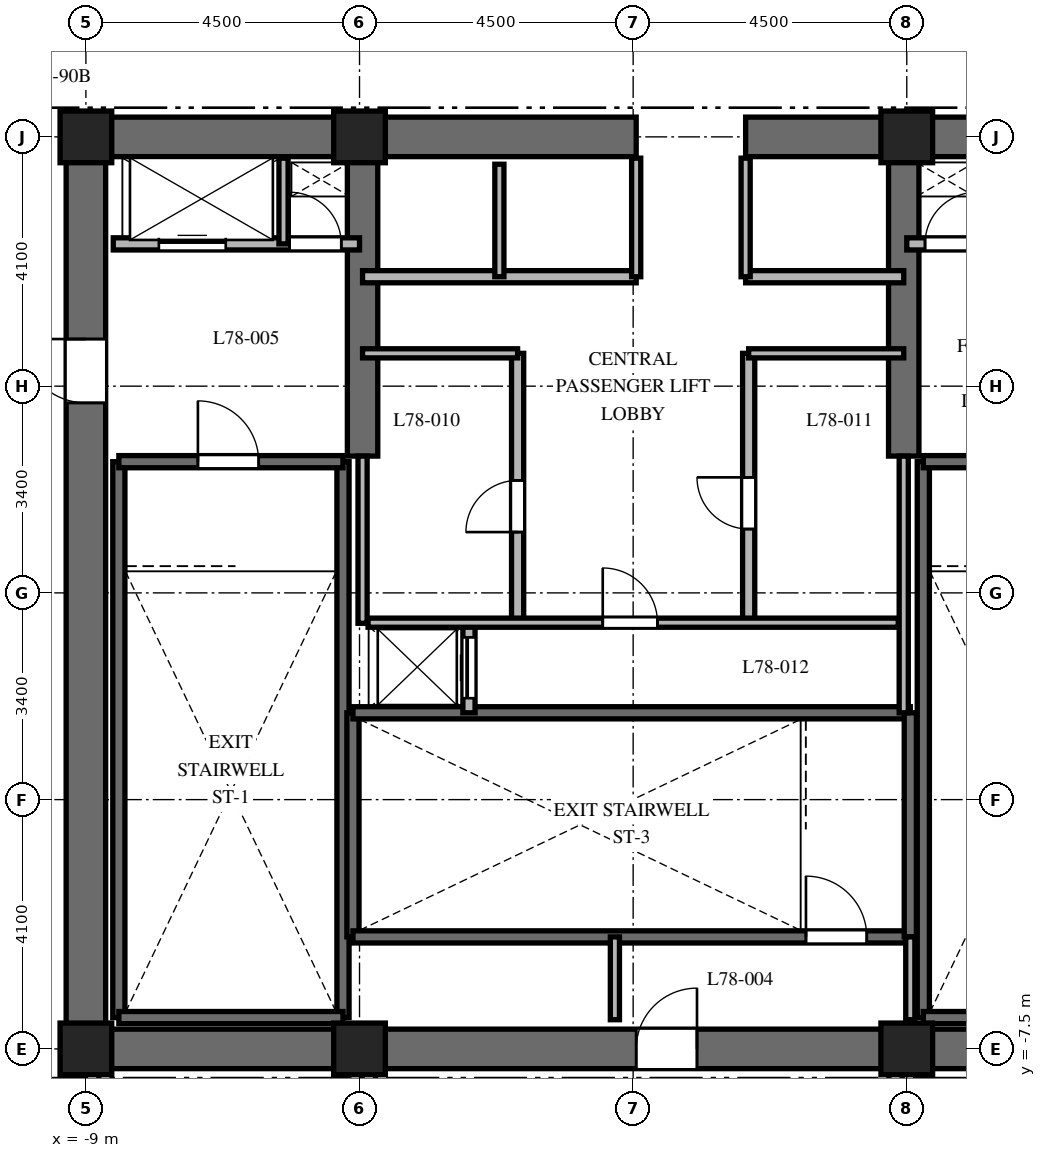
"""IFC4 building model, lengths in metres.
Left out: names, types, materials, properties, quantities, classifications, styles, units other than length and angle.
Written with IfcOpenShell. Run it as: python <this file> out.ifc"""

import sys

from ifc_helpers import new_model, si_unit, direction, frame, frame_2d, origin, origin_2d, place, context, subcontext, project, spatial, rectangle, extrude, element, fill, save


model = new_model("IFC4")
c1 = context("Model", 3, precision=1e-05, world=origin(), true_north=direction((0.0, 1.0)))
c2 = subcontext(c1, "Body", "Model", "MODEL_VIEW")
j1 = project(units=[si_unit("LENGTHUNIT", "METRE"), si_unit("PLANEANGLEUNIT", "RADIAN")], contexts=[c1])
p1 = place(None, origin())
s1 = spatial("IfcSite", under=j1, at=p1, CompositionType="ELEMENT")
p2 = place(p1, origin())
s2 = spatial("IfcBuilding", under=s1, at=p2, CompositionType="ELEMENT")
p3 = place(p2, frame((0.0, 0.0, 315.9)))
s3 = spatial("IfcBuildingStorey", under=s2, at=p3, CompositionType="ELEMENT", Elevation=315.9)
p4 = place(p3, frame((-9.325, -7.5, 0.0), z_axis=(0.0, 0.0, 1.0), x_axis=(1.0, 0.0, 0.0)))
e1 = element("IfcWall", 1, at=p4, inside=s3, PredefinedType="SHEAR", context=c2, shape_type="SweptSolid", body=[
    extrude(rectangle(XDim=18.65, YDim=0.65, at=frame_2d((9.325, 0.0))), origin(), (0.0, 0.0, 1.0), 5.5),
])
p5 = place(p4, frame((9.375, 0.0, 0.0)))
e2 = element("IfcOpeningElement", 2, at=p5, cuts=e1, PredefinedType="OPENING", context=c2, shape_type="SweptSolid", body=[
    extrude(rectangle(XDim=1.0, YDim=2.15, at=frame_2d((0.5, 1.075))), frame((0.0, 0.335, 0.0), z_axis=(0.0, -1.0, 0.0), x_axis=(1.0, 0.0, 0.0)), (0.0, 0.0, 1.0), 0.67),
])
p6 = place(p3, frame((-9.325, 7.5, 0.0), z_axis=(0.0, 0.0, 1.0), x_axis=(1.0, 0.0, 0.0)))
e3 = element("IfcWall", 3, at=p6, inside=s3, PredefinedType="SHEAR", context=c2, shape_type="SweptSolid", body=[
    extrude(rectangle(XDim=9.375, YDim=0.65, at=frame_2d((4.688, 0.0))), origin(), (0.0, 0.0, 1.0), 5.5),
])
p7 = place(p3, frame((1.85, 7.5, 0.0), z_axis=(0.0, 0.0, 1.0), x_axis=(1.0, 0.0, 0.0)))
e4 = element("IfcWall", 4, at=p7, inside=s3, PredefinedType="SHEAR", context=c2, shape_type="SweptSolid", body=[
    extrude(rectangle(XDim=7.475, YDim=0.65, at=frame_2d((3.737, 0.0))), origin(), (0.0, 0.0, 1.0), 5.5),
])
p8 = place(p3, frame((-9.0, -7.175, 0.0), z_axis=(0.0, 0.0, 1.0), x_axis=(0.0, 1.0, 0.0)))
e5 = element("IfcWall", 5, at=p8, inside=s3, PredefinedType="SHEAR", context=c2, shape_type="SweptSolid", body=[
    extrude(rectangle(XDim=14.35, YDim=0.65, at=frame_2d((7.175, 0.0))), origin(), (0.0, 0.0, 1.0), 5.5),
])
p9 = place(p8, frame((10.3, 0.0, 0.0)))
e6 = element("IfcOpeningElement", 6, at=p9, cuts=e5, PredefinedType="OPENING", context=c2, shape_type="SweptSolid", body=[
    extrude(rectangle(XDim=1.05, YDim=2.15, at=frame_2d((0.525, 1.075))), frame((0.0, 0.335, 0.0), z_axis=(0.0, -1.0, 0.0), x_axis=(1.0, 0.0, 0.0)), (0.0, 0.0, 1.0), 0.67),
])
for number, where, z_axis, x_axis in (
    (7, (-4.45, 2.25, 0.0), (0.0, 0.0, 1.0), (0.0, 1.0, 0.0)),
    (8, (4.45, 2.25, 0.0), (0.0, 0.0, 1.0), (0.0, 1.0, 0.0)),
):
    element("IfcWall", number, at=place(p3, frame(where, z_axis=z_axis, x_axis=x_axis)), inside=s3, PredefinedType="SHEAR", context=c2, shape_type="SweptSolid", body=[
        extrude(rectangle(XDim=4.925, YDim=0.5, at=frame_2d((2.462, 0.0))), origin(), (0.0, 0.0, 1.0), 5.5),
    ])
for number, where, z_axis, x_axis in (
    (9, (-8.458, -6.985, 0.0), (0.0, 0.0, 1.0), (0.0, 1.0, 0.0)),
    (10, (-4.772, -6.985, 0.0), (0.0, 0.0, 1.0), (0.0, 1.0, 0.0)),
):
    element("IfcWall", number, at=place(p3, frame(where, z_axis=z_axis, x_axis=x_axis)), inside=s3, PredefinedType="SHEAR", context=c2, shape_type="SweptSolid", body=[
        extrude(rectangle(XDim=9.143, YDim=0.2, at=frame_2d((4.572, 0.0))), origin(), (0.0, 0.0, 1.0), 5.5),
    ])
p10 = place(p3, frame((-8.458, -6.985, 0.0), z_axis=(0.0, 0.0, 1.0), x_axis=(1.0, 0.0, 0.0)))
e11 = element("IfcWall", 11, at=p10, inside=s3, PredefinedType="SHEAR", context=c2, shape_type="SweptSolid", body=[
    extrude(rectangle(XDim=3.686, YDim=0.2, at=frame_2d((1.843, 0.0))), origin(), (0.0, 0.0, 1.0), 5.5),
])
p11 = place(p3, frame((-8.458, 2.158, 0.0), z_axis=(0.0, 0.0, 1.0), x_axis=(1.0, 0.0, 0.0)))
e12 = element("IfcWall", 12, at=p11, inside=s3, PredefinedType="SHEAR", context=c2, shape_type="SweptSolid", body=[
    extrude(rectangle(XDim=3.686, YDim=0.2, at=frame_2d((1.843, 0.0))), origin(), (0.0, 0.0, 1.0), 5.5),
])
p12 = place(p11, frame((1.3, 0.0, 0.0)))
e13 = element("IfcOpeningElement", 13, at=p12, cuts=e12, PredefinedType="OPENING", context=c2, shape_type="SweptSolid", body=[
    extrude(rectangle(XDim=1.0, YDim=2.15, at=frame_2d((0.5, 1.075))), frame((0.0, 0.11, 0.0), z_axis=(0.0, -1.0, 0.0), x_axis=(1.0, 0.0, 0.0)), (0.0, 0.0, 1.0), 0.22),
])
p13 = place(p3, frame((4.772, -6.985, 0.0), z_axis=(0.0, 0.0, 1.0), x_axis=(0.0, 1.0, 0.0)))
e14 = element("IfcWall", 14, at=p13, inside=s3, PredefinedType="SHEAR", context=c2, shape_type="SweptSolid", body=[
    extrude(rectangle(XDim=9.143, YDim=0.2, at=frame_2d((4.572, 0.0))), origin(), (0.0, 0.0, 1.0), 5.5),
])
p14 = place(p3, frame((4.772, -6.985, 0.0), z_axis=(0.0, 0.0, 1.0), x_axis=(1.0, 0.0, 0.0)))
e15 = element("IfcWall", 15, at=p14, inside=s3, PredefinedType="SHEAR", context=c2, shape_type="SweptSolid", body=[
    extrude(rectangle(XDim=3.686, YDim=0.2, at=frame_2d((1.843, 0.0))), origin(), (0.0, 0.0, 1.0), 5.5),
])
p15 = place(p3, frame((4.772, 2.158, 0.0), z_axis=(0.0, 0.0, 1.0), x_axis=(1.0, 0.0, 0.0)))
e16 = element("IfcWall", 16, at=p15, inside=s3, PredefinedType="SHEAR", context=c2, shape_type="SweptSolid", body=[
    extrude(rectangle(XDim=3.686, YDim=0.2, at=frame_2d((1.843, 0.0))), origin(), (0.0, 0.0, 1.0), 5.5),
])
p16 = place(p15, frame((1.35, 0.0, 0.0)))
e17 = element("IfcOpeningElement", 17, at=p16, cuts=e16, PredefinedType="OPENING", context=c2, shape_type="SweptSolid", body=[
    extrude(rectangle(XDim=1.0, YDim=2.15, at=frame_2d((0.5, 1.075))), frame((0.0, 0.11, 0.0), z_axis=(0.0, -1.0, 0.0), x_axis=(1.0, 0.0, 0.0)), (0.0, 0.0, 1.0), 0.22),
])
p17 = place(p3, frame((-4.608, -5.658, 0.0), z_axis=(0.0, 0.0, 1.0), x_axis=(0.0, 1.0, 0.0)))
e18 = element("IfcWall", 18, at=p17, inside=s3, PredefinedType="SHEAR", context=c2, shape_type="SweptSolid", body=[
    extrude(rectangle(XDim=3.686, YDim=0.2, at=frame_2d((1.843, 0.0))), origin(), (0.0, 0.0, 1.0), 5.5),
])
p18 = place(p3, frame((-4.608, -5.658, 0.0), z_axis=(0.0, 0.0, 1.0), x_axis=(1.0, 0.0, 0.0)))
e19 = element("IfcWall", 19, at=p18, inside=s3, PredefinedType="SHEAR", context=c2, shape_type="SweptSolid", body=[
    extrude(rectangle(XDim=9.166, YDim=0.2, at=frame_2d((4.583, 0.0))), origin(), (0.0, 0.0, 1.0), 5.5),
])
p19 = place(p18, frame((7.45, 0.0, 0.0)))
e20 = element("IfcOpeningElement", 20, at=p19, cuts=e19, PredefinedType="OPENING", context=c2, shape_type="SweptSolid", body=[
    extrude(rectangle(XDim=1.0, YDim=2.15, at=frame_2d((0.5, 1.075))), frame((0.0, 0.11, 0.0), z_axis=(0.0, -1.0, 0.0), x_axis=(1.0, 0.0, 0.0)), (0.0, 0.0, 1.0), 0.22),
])
p20 = place(p3, frame((-4.608, -1.972, 0.0), z_axis=(0.0, 0.0, 1.0), x_axis=(1.0, 0.0, 0.0)))
e21 = element("IfcWall", 21, at=p20, inside=s3, PredefinedType="SHEAR", context=c2, shape_type="SweptSolid", body=[
    extrude(rectangle(XDim=9.166, YDim=0.2, at=frame_2d((4.583, 0.0))), origin(), (0.0, 0.0, 1.0), 5.5),
])
p21 = place(p3, frame((4.558, -5.658, 0.0), z_axis=(0.0, 0.0, 1.0), x_axis=(0.0, 1.0, 0.0)))
e22 = element("IfcWall", 22, at=p21, inside=s3, PredefinedType="SHEAR", context=c2, shape_type="SweptSolid", body=[
    extrude(rectangle(XDim=3.686, YDim=0.2, at=frame_2d((1.843, 0.0))), origin(), (0.0, 0.0, 1.0), 5.5),
])
for number, where, z_axis, x_axis in (
    (23, (-9.0, -7.5, 0.0), (0.0, 0.0, 1.0), (1.0, 0.0, 0.0)),
    (24, (-4.5, -7.5, 0.0), (0.0, 0.0, 1.0), (1.0, 0.0, 0.0)),
    (25, (4.5, -7.5, 0.0), (0.0, 0.0, 1.0), (1.0, 0.0, 0.0)),
    (26, (4.5, 7.5, 0.0), (0.0, 0.0, 1.0), (1.0, 0.0, 0.0)),
    (27, (-4.5, 7.5, 0.0), (0.0, 0.0, 1.0), (1.0, 0.0, 0.0)),
    (28, (-9.0, 7.5, 0.0), (0.0, 0.0, 1.0), (1.0, 0.0, 0.0)),
):
    element("IfcColumn", number, at=place(p3, frame(where, z_axis=z_axis, x_axis=x_axis)), inside=s3, PredefinedType="COLUMN", context=c2, shape_type="SweptSolid", body=[
        extrude(rectangle(XDim=0.85, YDim=0.85, at=origin_2d()), origin(), (0.0, 0.0, 1.0), 5.5),
    ])
for number, where, z_axis, x_axis in (
    (29, (-0.3, -7.02, 0.0), (0.0, 0.0, 1.0), (0.0, 1.0, 0.0)),
    (30, (4.558, -7.02, 0.0), (0.0, 0.0, 1.0), (0.0, 1.0, 0.0)),
):
    element("IfcWall", number, at=place(p3, frame(where, z_axis=z_axis, x_axis=x_axis)), inside=s3, PredefinedType="PARTITIONING", context=c2, shape_type="SweptSolid", body=[
        extrude(rectangle(XDim=1.362, YDim=0.15, at=frame_2d((0.681, 0.0))), origin(), (0.0, 0.0, 1.0), 5.18),
    ])
p22 = place(p3, frame((-8.55, 5.74, 0.0), z_axis=(0.0, 0.0, 1.0), x_axis=(1.0, 0.0, 0.0)))
e31 = element("IfcWall", 31, at=p22, inside=s3, PredefinedType="PARTITIONING", context=c2, shape_type="SweptSolid", body=[
    extrude(rectangle(XDim=4.05, YDim=0.2, at=frame_2d((2.025, 0.0))), origin(), (0.0, 0.0, 1.0), 5.18),
])
p23 = place(p22, frame((0.75, 0.0, 0.0)))
e32 = element("IfcOpeningElement", 32, at=p23, cuts=e31, PredefinedType="OPENING", context=c2, shape_type="SweptSolid", body=[
    extrude(rectangle(XDim=1.1, YDim=2.2, at=frame_2d((0.55, 1.1))), frame((0.0, 0.11, 0.0), z_axis=(0.0, -1.0, 0.0), x_axis=(1.0, 0.0, 0.0)), (0.0, 0.0, 1.0), 0.22),
])
p24 = place(p22, frame((2.9, 0.0, 0.0)))
e33 = element("IfcOpeningElement", 33, at=p24, cuts=e31, PredefinedType="OPENING", context=c2, shape_type="SweptSolid", body=[
    extrude(rectangle(XDim=0.85, YDim=2.03, at=frame_2d((0.425, 1.015))), frame((0.0, 0.11, 0.0), z_axis=(0.0, -1.0, 0.0), x_axis=(1.0, 0.0, 0.0)), (0.0, 0.0, 1.0), 0.22),
])
p25 = place(p3, frame((-5.75, 5.74, 0.0), z_axis=(0.0, 0.0, 1.0), x_axis=(0.0, 1.0, 0.0)))
e34 = element("IfcWall", 34, at=p25, inside=s3, PredefinedType="PARTITIONING", context=c2, shape_type="SweptSolid", body=[
    extrude(rectangle(XDim=1.41, YDim=0.15, at=frame_2d((0.705, 0.0))), origin(), (0.0, 0.0, 1.0), 5.18),
])
p26 = place(p3, frame((4.5, 5.74, 0.0), z_axis=(0.0, 0.0, 1.0), x_axis=(1.0, 0.0, 0.0)))
e35 = element("IfcWall", 35, at=p26, inside=s3, PredefinedType="PARTITIONING", context=c2, shape_type="SweptSolid", body=[
    extrude(rectangle(XDim=4.05, YDim=0.2, at=frame_2d((2.025, 0.0))), origin(), (0.0, 0.0, 1.0), 5.18),
])
p27 = place(p26, frame((0.3, 0.0, 0.0)))
e36 = element("IfcOpeningElement", 36, at=p27, cuts=e35, PredefinedType="OPENING", context=c2, shape_type="SweptSolid", body=[
    extrude(rectangle(XDim=0.85, YDim=2.03, at=frame_2d((0.425, 1.015))), frame((0.0, 0.11, 0.0), z_axis=(0.0, -1.0, 0.0), x_axis=(1.0, 0.0, 0.0)), (0.0, 0.0, 1.0), 0.22),
])
p28 = place(p26, frame((2.15, 0.0, 0.0)))
e37 = element("IfcOpeningElement", 37, at=p28, cuts=e35, PredefinedType="OPENING", context=c2, shape_type="SweptSolid", body=[
    extrude(rectangle(XDim=1.1, YDim=2.2, at=frame_2d((0.55, 1.1))), frame((0.0, 0.11, 0.0), z_axis=(0.0, -1.0, 0.0), x_axis=(1.0, 0.0, 0.0)), (0.0, 0.0, 1.0), 0.22),
])
p29 = place(p3, frame((-2.7, -1.972, 0.0), z_axis=(0.0, 0.0, 1.0), x_axis=(0.0, 1.0, 0.0)))
e38 = element("IfcWall", 38, at=p29, inside=s3, PredefinedType="PARTITIONING", context=c2, shape_type="SweptSolid", body=[
    extrude(rectangle(XDim=1.472, YDim=0.2, at=frame_2d((0.736, 0.0))), origin(), (0.0, 0.0, 1.0), 5.18),
])
p30 = place(p29, frame((0.24, 0.0, 0.0)))
e39 = element("IfcOpeningElement", 39, at=p30, cuts=e38, PredefinedType="OPENING", context=c2, shape_type="SweptSolid", body=[
    extrude(rectangle(XDim=1.0, YDim=2.2, at=frame_2d((0.5, 1.1))), frame((0.0, 0.11, 0.0), z_axis=(0.0, -1.0, 0.0), x_axis=(1.0, 0.0, 0.0)), (0.0, 0.0, 1.0), 0.22),
])
p31 = place(p3, frame((-4.45, 5.2, 0.0), z_axis=(0.0, 0.0, 1.0), x_axis=(1.0, 0.0, 0.0)))
e40 = element("IfcWall", 40, at=p31, inside=s3, PredefinedType="PARTITIONING", context=c2, shape_type="SweptSolid", body=[
    extrude(rectangle(XDim=4.5, YDim=0.2, at=frame_2d((2.25, 0.0))), origin(), (0.0, 0.0, 1.0), 5.18),
])
p32 = place(p3, frame((1.85, 5.2, 0.0), z_axis=(0.0, 0.0, 1.0), x_axis=(1.0, 0.0, 0.0)))
e41 = element("IfcWall", 41, at=p32, inside=s3, PredefinedType="PARTITIONING", context=c2, shape_type="SweptSolid", body=[
    extrude(rectangle(XDim=2.6, YDim=0.2, at=frame_2d((1.3, 0.0))), origin(), (0.0, 0.0, 1.0), 5.18),
])
p33 = place(p3, frame((-2.2, 5.2, 0.0), z_axis=(0.0, 0.0, 1.0), x_axis=(0.0, 1.0, 0.0)))
e42 = element("IfcWall", 42, at=p33, inside=s3, PredefinedType="PARTITIONING", context=c2, shape_type="SweptSolid", body=[
    extrude(rectangle(XDim=1.85, YDim=0.15, at=frame_2d((0.925, 0.0))), origin(), (0.0, 0.0, 1.0), 5.18),
])
for number, where, z_axis, x_axis in (
    (43, (0.05, 5.2, 0.0), (0.0, 0.0, 1.0), (0.0, 1.0, 0.0)),
    (44, (1.85, 5.2, 0.0), (0.0, 0.0, 1.0), (0.0, 1.0, 0.0)),
):
    element("IfcWall", number, at=place(p3, frame(where, z_axis=z_axis, x_axis=x_axis)), inside=s3, PredefinedType="PARTITIONING", context=c2, shape_type="SweptSolid", body=[
        extrude(rectangle(XDim=1.95, YDim=0.15, at=frame_2d((0.975, 0.0))), origin(), (0.0, 0.0, 1.0), 5.18),
    ])
p34 = place(p3, frame((-4.45, -0.5, 0.0), z_axis=(0.0, 0.0, 1.0), x_axis=(0.0, 1.0, 0.0)))
e45 = element("IfcWall", 45, at=p34, inside=s3, PredefinedType="PARTITIONING", context=c2, shape_type="SweptSolid", body=[
    extrude(rectangle(XDim=2.75, YDim=0.15, at=frame_2d((1.375, 0.0))), origin(), (0.0, 0.0, 1.0), 5.18),
])
p35 = place(p3, frame((4.45, -1.972, 0.0), z_axis=(0.0, 0.0, 1.0), x_axis=(0.0, 1.0, 0.0)))
e46 = element("IfcWall", 46, at=p35, inside=s3, PredefinedType="PARTITIONING", context=c2, shape_type="SweptSolid", body=[
    extrude(rectangle(XDim=4.222, YDim=0.15, at=frame_2d((2.111, 0.0))), origin(), (0.0, 0.0, 1.0), 5.18),
])
p36 = place(p3, frame((-1.9, -0.5, 0.0), z_axis=(0.0, 0.0, 1.0), x_axis=(0.0, 1.0, 0.0)))
e47 = element("IfcWall", 47, at=p36, inside=s3, PredefinedType="PARTITIONING", context=c2, shape_type="SweptSolid", body=[
    extrude(rectangle(XDim=4.44, YDim=0.2, at=frame_2d((2.22, 0.0))), origin(), (0.0, 0.0, 1.0), 5.18),
])
p37 = place(p36, frame((1.5, 0.0, 0.0)))
e48 = element("IfcOpeningElement", 48, at=p37, cuts=e47, PredefinedType="OPENING", context=c2, shape_type="SweptSolid", body=[
    extrude(rectangle(XDim=0.85, YDim=2.03, at=frame_2d((0.425, 1.015))), frame((0.0, 0.11, 0.0), z_axis=(0.0, -1.0, 0.0), x_axis=(1.0, 0.0, 0.0)), (0.0, 0.0, 1.0), 0.22),
])
p38 = place(p3, frame((-4.45, 3.94, 0.0), z_axis=(0.0, 0.0, 1.0), x_axis=(1.0, 0.0, 0.0)))
e49 = element("IfcWall", 49, at=p38, inside=s3, PredefinedType="PARTITIONING", context=c2, shape_type="SweptSolid", body=[
    extrude(rectangle(XDim=2.55, YDim=0.15, at=frame_2d((1.275, 0.0))), origin(), (0.0, 0.0, 1.0), 5.18),
])
p39 = place(p3, frame((1.9, -0.5, 0.0), z_axis=(0.0, 0.0, 1.0), x_axis=(0.0, 1.0, 0.0)))
e50 = element("IfcWall", 50, at=p39, inside=s3, PredefinedType="PARTITIONING", context=c2, shape_type="SweptSolid", body=[
    extrude(rectangle(XDim=4.44, YDim=0.2, at=frame_2d((2.22, 0.0))), origin(), (0.0, 0.0, 1.0), 5.18),
])
p40 = place(p39, frame((1.55, 0.0, 0.0)))
e51 = element("IfcOpeningElement", 51, at=p40, cuts=e50, PredefinedType="OPENING", context=c2, shape_type="SweptSolid", body=[
    extrude(rectangle(XDim=0.85, YDim=2.03, at=frame_2d((0.425, 1.015))), frame((0.0, 0.11, 0.0), z_axis=(0.0, -1.0, 0.0), x_axis=(1.0, 0.0, 0.0)), (0.0, 0.0, 1.0), 0.22),
])
p41 = place(p3, frame((1.9, 3.94, 0.0), z_axis=(0.0, 0.0, 1.0), x_axis=(1.0, 0.0, 0.0)))
e52 = element("IfcWall", 52, at=p41, inside=s3, PredefinedType="PARTITIONING", context=c2, shape_type="SweptSolid", body=[
    extrude(rectangle(XDim=2.55, YDim=0.15, at=frame_2d((1.275, 0.0))), origin(), (0.0, 0.0, 1.0), 5.18),
])
p42 = place(p3, frame((-4.36, -0.49, 0.0), z_axis=(0.0, 0.0, 1.0), x_axis=(1.0, 0.0, 0.0)))
e53 = element("IfcWall", 53, at=p42, inside=s3, PredefinedType="PARTITIONING", context=c2, shape_type="SweptSolid", body=[
    extrude(rectangle(XDim=8.72, YDim=0.15, at=frame_2d((4.36, 0.0))), origin(), (0.0, 0.0, 1.0), 5.18),
])
p43 = place(p42, frame((3.86, 0.0, 0.0)))
e54 = element("IfcOpeningElement", 54, at=p43, cuts=e53, PredefinedType="OPENING", context=c2, shape_type="SweptSolid", body=[
    extrude(rectangle(XDim=0.9, YDim=2.03, at=frame_2d((0.45, 1.015))), frame((0.0, 0.085, 0.0), z_axis=(0.0, -1.0, 0.0), x_axis=(1.0, 0.0, 0.0)), (0.0, 0.0, 1.0), 0.17),
])
p44 = place(p12, origin())
e55 = element("IfcDoor", 55, at=p44, inside=s3, OperationType="SINGLE_SWING_LEFT", PredefinedType="DOOR", context=c2, shape_type="SweptSolid", body=[
    extrude(rectangle(XDim=1.0, YDim=2.15, at=frame_2d((0.5, 1.075))), frame((0.0, 0.025, 0.0), z_axis=(0.0, -1.0, 0.0), x_axis=(1.0, 0.0, 0.0)), (0.0, 0.0, 1.0), 0.05),
])
fill(e13, e55)
p45 = place(p19, origin())
e56 = element("IfcDoor", 56, at=p45, inside=s3, OperationType="SINGLE_SWING_LEFT", PredefinedType="DOOR", context=c2, shape_type="SweptSolid", body=[
    extrude(rectangle(XDim=1.0, YDim=2.15, at=frame_2d((0.5, 1.075))), frame((0.0, 0.025, 0.0), z_axis=(0.0, -1.0, 0.0), x_axis=(1.0, 0.0, 0.0)), (0.0, 0.0, 1.0), 0.05),
])
fill(e20, e56)
p46 = place(p5, origin())
e57 = element("IfcDoor", 57, at=p46, inside=s3, OperationType="SINGLE_SWING_RIGHT", PredefinedType="DOOR", context=c2, shape_type="SweptSolid", body=[
    extrude(rectangle(XDim=1.0, YDim=2.15, at=frame_2d((0.5, 1.075))), frame((0.0, 0.025, 0.0), z_axis=(0.0, -1.0, 0.0), x_axis=(1.0, 0.0, 0.0)), (0.0, 0.0, 1.0), 0.05),
])
fill(e2, e57)
p47 = place(p9, origin())
e58 = element("IfcDoor", 58, at=p47, inside=s3, OperationType="SINGLE_SWING_RIGHT", PredefinedType="DOOR", context=c2, shape_type="SweptSolid", body=[
    extrude(rectangle(XDim=1.05, YDim=2.15, at=frame_2d((0.525, 1.075))), frame((0.0, 0.025, 0.0), z_axis=(0.0, -1.0, 0.0), x_axis=(1.0, 0.0, 0.0)), (0.0, 0.0, 1.0), 0.05),
])
fill(e6, e58)
p48 = place(p23, origin())
e59 = element("IfcDoor", 59, at=p48, inside=s3, OperationType="SLIDING_TO_LEFT", PredefinedType="DOOR", context=c2, shape_type="SweptSolid", body=[
    extrude(rectangle(XDim=1.1, YDim=2.2, at=frame_2d((0.55, 1.1))), frame((0.0, 0.025, 0.0), z_axis=(0.0, -1.0, 0.0), x_axis=(1.0, 0.0, 0.0)), (0.0, 0.0, 1.0), 0.05),
])
fill(e32, e59)
p49 = place(p24, origin())
e60 = element("IfcDoor", 60, at=p49, inside=s3, OperationType="SINGLE_SWING_LEFT", PredefinedType="DOOR", context=c2, shape_type="SweptSolid", body=[
    extrude(rectangle(XDim=0.85, YDim=2.03, at=frame_2d((0.425, 1.015))), frame((0.0, 0.025, 0.0), z_axis=(0.0, -1.0, 0.0), x_axis=(1.0, 0.0, 0.0)), (0.0, 0.0, 1.0), 0.05),
])
fill(e33, e60)
p50 = place(p27, origin())
e61 = element("IfcDoor", 61, at=p50, inside=s3, OperationType="SINGLE_SWING_RIGHT", PredefinedType="DOOR", context=c2, shape_type="SweptSolid", body=[
    extrude(rectangle(XDim=0.85, YDim=2.03, at=frame_2d((0.425, 1.015))), frame((0.0, 0.025, 0.0), z_axis=(0.0, -1.0, 0.0), x_axis=(1.0, 0.0, 0.0)), (0.0, 0.0, 1.0), 0.05),
])
fill(e36, e61)
p51 = place(p30, origin())
e62 = element("IfcDoor", 62, at=p51, inside=s3, OperationType="SLIDING_TO_LEFT", PredefinedType="DOOR", context=c2, shape_type="SweptSolid", body=[
    extrude(rectangle(XDim=1.0, YDim=2.2, at=frame_2d((0.5, 1.1))), frame((0.0, 0.025, 0.0), z_axis=(0.0, -1.0, 0.0), x_axis=(1.0, 0.0, 0.0)), (0.0, 0.0, 1.0), 0.05),
])
fill(e39, e62)
p52 = place(p37, origin())
e63 = element("IfcDoor", 63, at=p52, inside=s3, OperationType="SINGLE_SWING_LEFT", PredefinedType="DOOR", context=c2, shape_type="SweptSolid", body=[
    extrude(rectangle(XDim=0.85, YDim=2.03, at=frame_2d((0.425, 1.015))), frame((0.0, 0.025, 0.0), z_axis=(0.0, -1.0, 0.0), x_axis=(1.0, 0.0, 0.0)), (0.0, 0.0, 1.0), 0.05),
])
fill(e48, e63)
p53 = place(p40, origin())
e64 = element("IfcDoor", 64, at=p53, inside=s3, OperationType="SINGLE_SWING_RIGHT", PredefinedType="DOOR", context=c2, shape_type="SweptSolid", body=[
    extrude(rectangle(XDim=0.85, YDim=2.03, at=frame_2d((0.425, 1.015))), frame((0.0, 0.025, 0.0), z_axis=(0.0, -1.0, 0.0), x_axis=(1.0, 0.0, 0.0)), (0.0, 0.0, 1.0), 0.05),
])
fill(e51, e64)
p54 = place(p43, origin())
e65 = element("IfcDoor", 65, at=p54, inside=s3, OperationType="SINGLE_SWING_LEFT", PredefinedType="DOOR", context=c2, shape_type="SweptSolid", body=[
    extrude(rectangle(XDim=0.9, YDim=2.03, at=frame_2d((0.45, 1.015))), frame((0.0, 0.025, 0.0), z_axis=(0.0, -1.0, 0.0), x_axis=(1.0, 0.0, 0.0)), (0.0, 0.0, 1.0), 0.05),
])
fill(e54, e65)
save(model, sys.argv[1])
